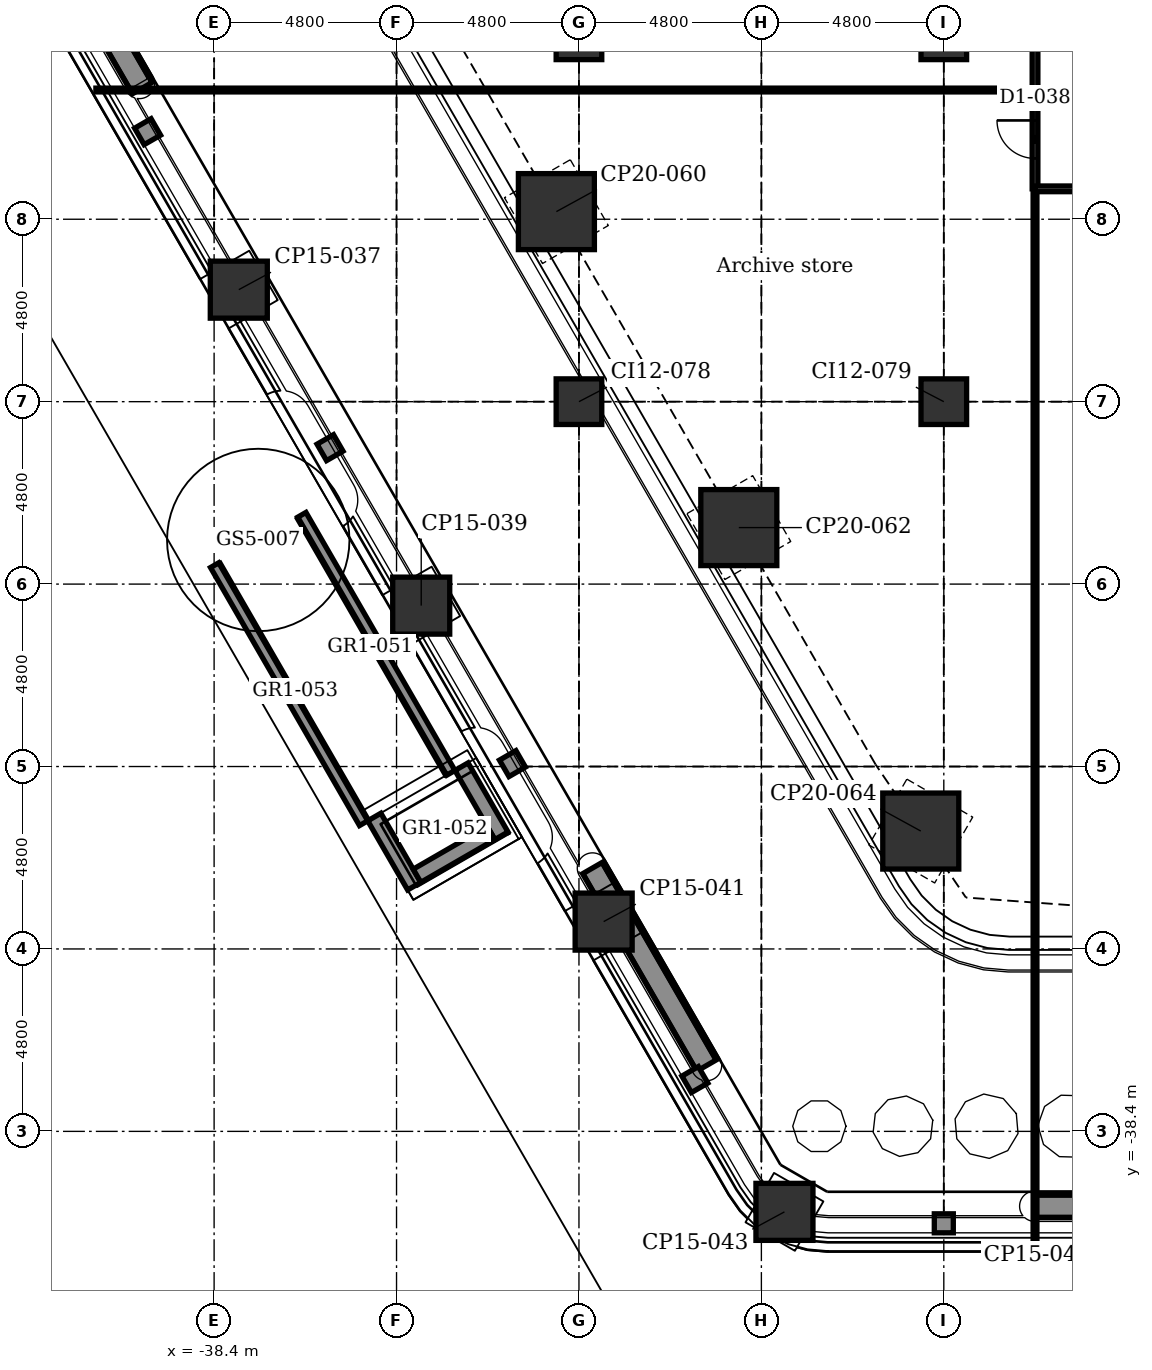
"""IFC4 building model, lengths in metres.
Left out: names, types, materials, properties, quantities, classifications, styles, units other than length and angle.
Written with IfcOpenShell. Run it as: python <this file> out.ifc"""

import sys

from ifc_helpers import new_model, si_unit, direction, frame, frame_2d, origin, origin_2d, place, context, subcontext, project, spatial, polyline, rectangle, outline, extrude, element, fill, save


model = new_model("IFC4")
c1 = context("Model", 3, precision=1e-05, world=origin(), true_north=direction((0.0, 1.0)))
c2 = subcontext(c1, "Body", "Model", "MODEL_VIEW")
j1 = project(units=[si_unit("LENGTHUNIT", "METRE"), si_unit("PLANEANGLEUNIT", "RADIAN")], contexts=[c1])
p1 = place(None, origin())
s1 = spatial("IfcSite", under=j1, at=p1, CompositionType="ELEMENT")
p2 = place(p1, origin())
s2 = spatial("IfcBuilding", under=s1, at=p2, CompositionType="ELEMENT")
p3 = place(p2, frame((0.0, 0.0, 12.4)))
s3 = spatial("IfcBuildingStorey", under=s2, at=p3, CompositionType="ELEMENT", Elevation=12.4)
for number, where, z_axis, x_axis in (
    (1, (-23.393, -40.518, -0.3), (0.0, 0.0, 1.0), (0.5, 0.866, 0.0)),
    (2, (-28.15, -32.88, -0.3), (0.0, 0.0, 1.0), (0.866, 0.5, 0.0)),
    (3, (-32.95, -24.567, -0.3), (0.0, 0.0, 1.0), (0.866, 0.5, 0.0)),
    (4, (-37.75, -16.253, -0.3), (0.0, 0.0, 1.0), (0.866, 0.5, 0.0)),
):
    element("IfcColumn", number, at=place(p3, frame(where, z_axis=z_axis, x_axis=x_axis)), inside=s3, PredefinedType="COLUMN", context=c2, shape_type="SweptSolid", body=[
        extrude(rectangle(XDim=1.5, YDim=1.5, at=origin_2d()), origin(), (0.0, 0.0, 1.0), 5.05),
    ])
for number, where, z_axis, x_axis in (
    (5, (-19.806, -30.498, -0.3), (0.0, 0.0, 1.0), (0.5, 0.866, 0.0)),
    (6, (-24.594, -22.513, -0.3), (0.0, 0.0, 1.0), (0.866, 0.5, 0.0)),
    (7, (-29.394, -14.199, -0.3), (0.0, 0.0, 1.0), (0.866, 0.5, 0.0)),
):
    element("IfcColumn", number, at=place(p3, frame(where, z_axis=z_axis, x_axis=x_axis)), inside=s3, PredefinedType="COLUMN", context=c2, shape_type="SweptSolid", body=[
        extrude(rectangle(XDim=2.0, YDim=2.0, at=origin_2d()), origin(), (0.0, 0.0, 1.0), 5.05),
    ])
for number, where, z_axis, x_axis in (
    (8, (-28.8, -19.2, -0.3), (0.0, 0.0, 1.0), (1.0, 0.0, 0.0)),
    (9, (-28.8, -9.6, -0.3), (0.0, 0.0, 1.0), (1.0, 0.0, 0.0)),
    (10, (-19.2, -19.2, -0.3), (0.0, 0.0, 1.0), (1.0, 0.0, 0.0)),
    (11, (-19.2, -9.6, -0.3), (0.0, 0.0, 1.0), (1.0, 0.0, 0.0)),
):
    element("IfcColumn", number, at=place(p3, frame(where, z_axis=z_axis, x_axis=x_axis)), inside=s3, PredefinedType="COLUMN", context=c2, shape_type="SweptSolid", body=[
        extrude(rectangle(XDim=1.2, YDim=1.2, at=origin_2d()), origin(), (0.0, 0.0, 1.0), 5.05),
    ])
p4 = place(p3, frame((-10.806, -40.369, 5.0), z_axis=(0.0, 0.0, 1.0), x_axis=(-1.0, 0.0, 0.0)))
e12 = element("IfcWall", 12, at=p4, inside=s3, PredefinedType="USERDEFINED", context=c2, shape_type="SweptSolid", body=[
    extrude(rectangle(XDim=6.0, YDim=0.6, at=frame_2d((3.0, 0.0))), origin(), (0.0, 0.0, 1.0), 0.7),
])
p5 = place(p3, frame((-40.292, -10.951, 5.0), z_axis=(0.0, 0.0, 1.0), x_axis=(-0.499976998774, 0.866038683141, 0.0)))
e13 = element("IfcWall", 13, at=p5, inside=s3, PredefinedType="USERDEFINED", context=c2, shape_type="SweptSolid", body=[
    extrude(rectangle(XDim=6.144, YDim=0.6, at=frame_2d((3.072, 0.0))), origin(), (0.0, 0.0, 1.0), 0.7),
])
p6 = place(p3, frame((-25.444, -36.668, 5.0), z_axis=(0.0, 0.0, 1.0), x_axis=(-0.499990139034, 0.866031096941, 0.0)))
e14 = element("IfcWall", 14, at=p6, inside=s3, PredefinedType="USERDEFINED", context=c2, shape_type="SweptSolid", body=[
    extrude(rectangle(XDim=6.0, YDim=0.6, at=frame_2d((3.0, 0.0))), origin(), (0.0, 0.0, 1.0), 0.7),
])
p7 = place(p3, frame((-36.091, -22.177, 0.0), z_axis=(0.0, 0.0, 1.0), x_axis=(0.499997407846, -0.86602690036, 0.0)))
e15 = element("IfcWall", 15, at=p7, inside=s3, PredefinedType="SOLIDWALL", context=c2, shape_type="SweptSolid", body=[
    extrude(outline(polyline([(0.0, 0.0), (7.84, 0.0), (7.84, 5.1), (0.0, 0.272), (0.0, 0.0)])), frame((0.0, 0.125, 0.0), z_axis=(0.0, -1.0, 0.0), x_axis=(1.0, 0.0, 0.0)), (0.0, 0.0, 1.0), 0.25),
])
p8 = place(p3, frame((-38.386, -23.502, 0.0), z_axis=(0.0, 0.0, 1.0), x_axis=(0.500020763015, -0.866013415921, 0.0)))
e16 = element("IfcWall", 16, at=p8, inside=s3, PredefinedType="SOLIDWALL", context=c2, shape_type="SweptSolid", body=[
    extrude(outline(polyline([(0.0, 0.0), (7.84, 0.0), (7.84, 5.1), (0.0, 0.272), (0.0, 0.0)])), frame((0.0, 0.125, 0.0), z_axis=(0.0, -1.0, 0.0), x_axis=(1.0, 0.0, 0.0)), (0.0, 0.0, 1.0), 0.25),
])
p9 = place(p3, frame((-33.135, -31.948, 0.45), z_axis=(0.0, 0.0, 1.0), x_axis=(-0.49994051562, 0.866059744384, 0.0)))
e17 = element("IfcWall", 17, at=p9, inside=s3, PredefinedType="SOLIDWALL", context=c2, shape_type="SweptSolid", body=[
    extrude(rectangle(XDim=2.1, YDim=0.4, at=frame_2d((1.05, 0.0))), origin(), (0.0, 0.0, 1.0), 4.35),
])
p10 = place(p3, frame((-30.84, -30.623, 0.45), z_axis=(0.0, 0.0, 1.0), x_axis=(-0.500027713859, 0.866009402589, 0.0)))
e18 = element("IfcWall", 18, at=p10, inside=s3, PredefinedType="SOLIDWALL", context=c2, shape_type="SweptSolid", body=[
    extrude(rectangle(XDim=2.1, YDim=0.4, at=frame_2d((1.05, 0.0))), origin(), (0.0, 0.0, 1.0), 4.35),
])
p11 = place(p3, frame((-31.113, -30.549, 0.45), z_axis=(0.0, 0.0, 1.0), x_axis=(-0.866017533419, -0.500013631625, 0.0)))
e19 = element("IfcWall", 19, at=p11, inside=s3, PredefinedType="SOLIDWALL", context=c2, shape_type="SweptSolid", body=[
    extrude(rectangle(XDim=2.25, YDim=0.4, at=frame_2d((1.125, 0.0))), origin(), (0.0, 0.0, 1.0), 4.35),
])
p12 = place(p3, frame((-18.95, -40.819, 0.0), z_axis=(0.0, 0.0, 1.0), x_axis=(-1.0, 0.0, 0.0)))
e20 = element("IfcWall", 20, at=p12, inside=s3, PredefinedType="SOLIDWALL", context=c2, shape_type="SweptSolid", body=[
    extrude(rectangle(XDim=0.5, YDim=0.5, at=frame_2d((0.25, 0.0))), origin(), (0.0, 0.0, 1.0), 4.45),
])
for number, where, z_axis, x_axis in (
    (21, (-25.625, -37.253, 0.0), (0.0, 0.0, 1.0), (-0.5, 0.866, 0.0)),
    (22, (-30.425, -28.939, 0.0), (0.0, 0.0, 1.0), (-0.5, 0.866, 0.0)),
    (23, (-35.225, -20.626, 0.0), (0.0, 0.0, 1.0), (-0.5, 0.866, 0.0)),
):
    element("IfcWall", number, at=place(p3, frame(where, z_axis=z_axis, x_axis=x_axis)), inside=s3, PredefinedType="SOLIDWALL", context=c2, shape_type="SweptSolid", body=[
        extrude(rectangle(XDim=0.5, YDim=0.5, at=frame_2d((0.25, 0.0))), origin(), (0.0, 0.0, 1.0), 4.45),
    ])
p13 = place(p3, frame((-40.025, -12.312, 0.0), z_axis=(0.0, 0.0, 1.0), x_axis=(-0.499919672301, 0.866071776036, 0.0)))
e24 = element("IfcWall", 24, at=p13, inside=s3, PredefinedType="SOLIDWALL", context=c2, shape_type="SweptSolid", body=[
    extrude(rectangle(XDim=0.5, YDim=0.5, at=frame_2d((0.25, 0.0))), origin(), (0.0, 0.0, 1.0), 4.45),
])
p14 = place(p3, frame((-16.8, -41.399, 0.0), z_axis=(0.0, 0.0, 1.0), x_axis=(0.0, 1.0, 0.0)))
e25 = element("IfcWall", 25, at=p14, inside=s3, PredefinedType="PARTITIONING", context=c2, shape_type="SweptSolid", body=[
    extrude(rectangle(XDim=27.799, YDim=0.1, at=frame_2d((13.899, 0.0))), origin(), (0.0, 0.0, 1.0), 4.7),
])
p15 = place(p3, frame((-16.8, -13.6, 0.0), z_axis=(0.0, 0.0, 1.0), x_axis=(0.0, 1.0, 0.0)))
e26 = element("IfcWall", 26, at=p15, inside=s3, PredefinedType="PARTITIONING", context=c2, shape_type="SweptSolid", body=[
    extrude(rectangle(XDim=9.65, YDim=0.15, at=frame_2d((4.825, 0.0))), origin(), (0.0, 0.0, 1.0), 4.7),
])
p16 = place(p15, frame((0.8, 0.0, 0.0)))
e27 = element("IfcOpeningElement", 27, at=p16, cuts=e26, PredefinedType="OPENING", context=c2, shape_type="SweptSolid", body=[
    extrude(rectangle(XDim=1.0, YDim=2.1, at=frame_2d((0.5, 1.05))), frame((0.0, 0.085, 0.0), z_axis=(0.0, -1.0, 0.0), x_axis=(1.0, 0.0, 0.0)), (0.0, 0.0, 1.0), 0.17),
])
p17 = place(p15, frame((6.2, 0.0, 0.0)))
e28 = element("IfcOpeningElement", 28, at=p17, cuts=e26, PredefinedType="OPENING", context=c2, shape_type="SweptSolid", body=[
    extrude(rectangle(XDim=1.0, YDim=2.1, at=frame_2d((0.5, 1.05))), frame((0.0, 0.085, 0.0), z_axis=(0.0, -1.0, 0.0), x_axis=(1.0, 0.0, 0.0)), (0.0, 0.0, 1.0), 0.17),
])
p18 = place(p3, frame((-16.8, -13.6, 0.0), z_axis=(0.0, 0.0, 1.0), x_axis=(1.0, 0.0, 0.0)))
e29 = element("IfcWall", 29, at=p18, inside=s3, PredefinedType="PARTITIONING", context=c2, shape_type="SweptSolid", body=[
    extrude(rectangle(XDim=33.6, YDim=0.15, at=frame_2d((16.8, 0.0))), origin(), (0.0, 0.0, 1.0), 4.7),
])
p19 = place(p18, frame((3.1, 0.0, 0.0)))
e30 = element("IfcOpeningElement", 30, at=p19, cuts=e29, PredefinedType="OPENING", context=c2, shape_type="SweptSolid", body=[
    extrude(rectangle(XDim=1.0, YDim=2.1, at=frame_2d((0.5, 1.05))), frame((0.0, 0.085, 0.0), z_axis=(0.0, -1.0, 0.0), x_axis=(1.0, 0.0, 0.0)), (0.0, 0.0, 1.0), 0.17),
])
p20 = place(p18, frame((11.5, 0.0, 0.0)))
e31 = element("IfcOpeningElement", 31, at=p20, cuts=e29, PredefinedType="OPENING", context=c2, shape_type="SweptSolid", body=[
    extrude(rectangle(XDim=1.0, YDim=2.1, at=frame_2d((0.5, 1.05))), frame((0.0, 0.085, 0.0), z_axis=(0.0, -1.0, 0.0), x_axis=(1.0, 0.0, 0.0)), (0.0, 0.0, 1.0), 0.17),
])
p21 = place(p18, frame((27.1, 0.0, 0.0)))
e32 = element("IfcOpeningElement", 32, at=p21, cuts=e29, PredefinedType="OPENING", context=c2, shape_type="SweptSolid", body=[
    extrude(rectangle(XDim=1.0, YDim=2.1, at=frame_2d((0.5, 1.05))), frame((0.0, 0.085, 0.0), z_axis=(0.0, -1.0, 0.0), x_axis=(1.0, 0.0, 0.0)), (0.0, 0.0, 1.0), 0.17),
])
p22 = place(p18, frame((18.7, 0.0, 0.0)))
e33 = element("IfcOpeningElement", 33, at=p22, cuts=e29, PredefinedType="OPENING", context=c2, shape_type="SweptSolid", body=[
    extrude(rectangle(XDim=1.0, YDim=2.1, at=frame_2d((0.5, 1.05))), frame((0.0, 0.085, 0.0), z_axis=(0.0, -1.0, 0.0), x_axis=(1.0, 0.0, 0.0)), (0.0, 0.0, 1.0), 0.17),
])
p23 = place(p3, frame((-41.51, -11.0, 0.0), z_axis=(0.0, 0.0, 1.0), x_axis=(1.0, 0.0, 0.0)))
e34 = element("IfcWall", 34, at=p23, inside=s3, PredefinedType="PARTITIONING", context=c2, shape_type="SweptSolid", body=[
    extrude(rectangle(XDim=24.71, YDim=0.1, at=frame_2d((12.355, 0.0))), origin(), (0.0, 0.0, 1.0), 4.7),
])
p24 = place(p16, origin())
e35 = element("IfcDoor", 35, at=p24, inside=s3, OperationType="SINGLE_SWING_RIGHT", PredefinedType="DOOR", context=c2, shape_type="SweptSolid", body=[
    extrude(rectangle(XDim=1.0, YDim=2.1, at=frame_2d((0.5, 1.05))), frame((0.0, 0.025, 0.0), z_axis=(0.0, -1.0, 0.0), x_axis=(1.0, 0.0, 0.0)), (0.0, 0.0, 1.0), 0.05),
])
fill(e27, e35)
save(model, sys.argv[1])
